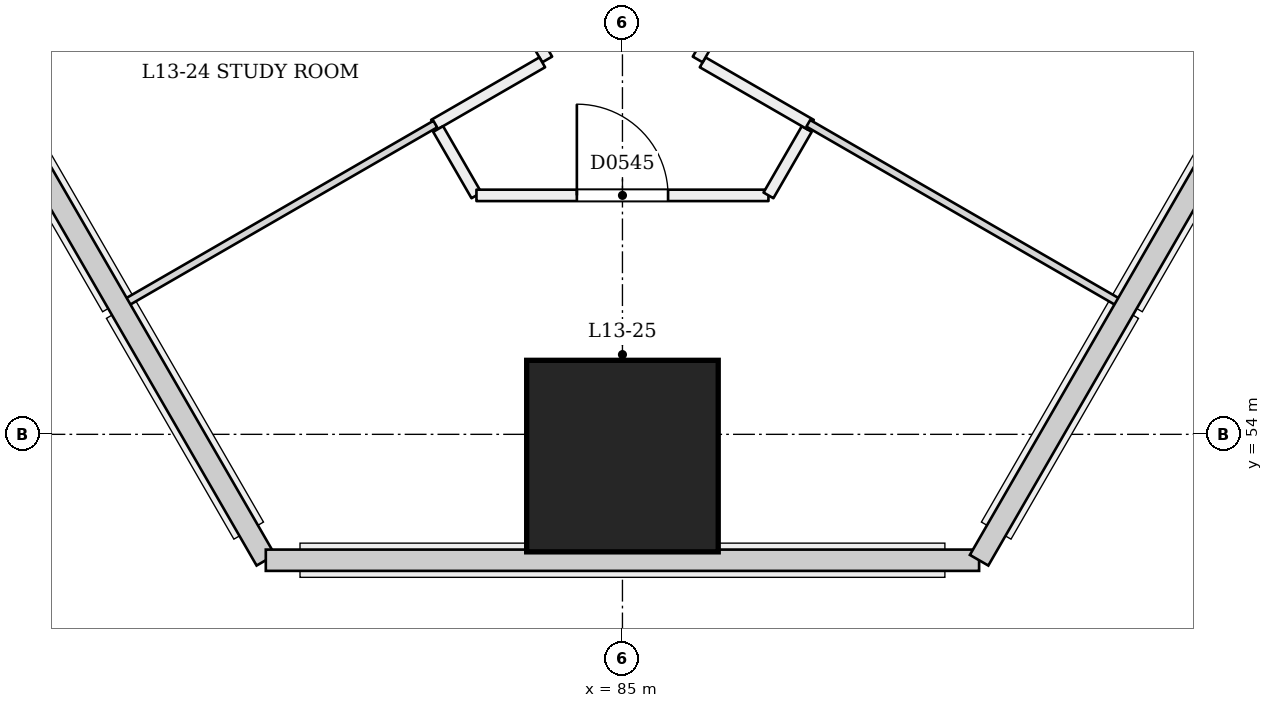
"""IFC4 building model, lengths in metres.
Left out: names, types, materials, properties, quantities, classifications, styles, units other than length and angle.
Written with IfcOpenShell. Run it as: python <this file> out.ifc"""

import sys

from ifc_helpers import new_model, si_unit, direction, frame, frame_2d, origin, origin_2d, place, context, subcontext, project, spatial, rectangle, extrude, element, fill, save


model = new_model("IFC4")
c1 = context("Model", 3, precision=1e-05, world=origin(), true_north=direction((0.0, 1.0)))
c2 = subcontext(c1, "Body", "Model", "MODEL_VIEW")
j1 = project(units=[si_unit("LENGTHUNIT", "METRE"), si_unit("PLANEANGLEUNIT", "RADIAN")], contexts=[c1])
p1 = place(None, origin())
s1 = spatial("IfcSite", under=j1, at=p1, CompositionType="ELEMENT")
p2 = place(p1, origin())
s2 = spatial("IfcBuilding", under=s1, at=p2, CompositionType="ELEMENT")
p3 = place(p2, frame((0.0, 0.0, 55.8)))
s3 = spatial("IfcBuildingStorey", under=s2, at=p3, CompositionType="ELEMENT", Elevation=55.8)
p4 = place(p3, frame((85.0, 53.644, 0.0), z_axis=(0.0, 0.058360852261, 0.998295552892), x_axis=(-1.0, 0.0, 0.0)))
e1 = element("IfcColumn", 1, at=p4, inside=s3, PredefinedType="COLUMN", context=c2, shape_type="SweptSolid", body=[
    extrude(rectangle(XDim=2.52, YDim=2.52, at=origin_2d()), origin(), (0.0, 0.0, 1.0), 3.606),
])
p5 = place(p3, frame((82.71, 61.184, 0.0), z_axis=(0.0, 0.0, 1.0), x_axis=(0.500006934395, -0.866021400173, 0.0)))
e2 = element("IfcWall", 2, at=p5, inside=s3, PredefinedType="PARTITIONING", context=c2, shape_type="SweptSolid", body=[
    extrude(rectangle(XDim=2.6, YDim=0.15, at=frame_2d((1.3, 0.0))), origin(), (0.0, 0.0, 1.0), 3.1),
])
p6 = place(p5, frame((0.294, 0.0, 0.0)))
e3 = element("IfcOpeningElement", 3, at=p6, cuts=e2, PredefinedType="OPENING", context=c2, shape_type="SweptSolid", body=[
    extrude(rectangle(XDim=1.0, YDim=2.1, at=frame_2d((0.5, 1.05))), frame((0.0, 0.085, 0.0), z_axis=(0.0, -1.0, 0.0), x_axis=(1.0, 0.0, 0.0)), (0.0, 0.0, 1.0), 0.171),
])
p7 = place(p3, frame((83.945, 58.894, 0.0), z_axis=(0.0, 0.0, 1.0), x_axis=(-0.866015045157, -0.50001794124, 0.0)))
e4 = element("IfcWall", 4, at=p7, inside=s3, PredefinedType="PARTITIONING", context=c2, shape_type="SweptSolid", body=[
    extrude(rectangle(XDim=1.645, YDim=0.15, at=frame_2d((0.823, 0.0))), origin(), (0.0, 0.0, 1.0), 3.1),
])
p8 = place(p3, frame((82.575, 58.017, 0.0), z_axis=(0.0, 0.0, 1.0), x_axis=(0.500071819257, -0.865983934946, 0.0)))
e5 = element("IfcWall", 5, at=p8, inside=s3, PredefinedType="PARTITIONING", context=c2, shape_type="SweptSolid", body=[
    extrude(rectangle(XDim=1.008, YDim=0.15, at=frame_2d((0.504, 0.0))), origin(), (0.0, 0.0, 1.0), 3.1),
])
p9 = place(p3, frame((83.079, 57.144, 0.0), z_axis=(0.0, 0.0, 1.0), x_axis=(1.0, 0.0, 0.0)))
e6 = element("IfcWall", 6, at=p9, inside=s3, PredefinedType="PARTITIONING", context=c2, shape_type="SweptSolid", body=[
    extrude(rectangle(XDim=3.842, YDim=0.15, at=frame_2d((1.921, 0.0))), origin(), (0.0, 0.0, 1.0), 3.1),
])
p10 = place(p9, frame((1.321, 0.0, 0.0)))
e7 = element("IfcOpeningElement", 7, at=p10, cuts=e6, PredefinedType="OPENING", context=c2, shape_type="SweptSolid", body=[
    extrude(rectangle(XDim=1.2, YDim=2.1, at=frame_2d((0.6, 1.05))), frame((0.0, 0.085, 0.0), z_axis=(0.0, -1.0, 0.0), x_axis=(1.0, 0.0, 0.0)), (0.0, 0.0, 1.0), 0.171),
])
p11 = place(p3, frame((86.921, 57.144, 0.0), z_axis=(0.0, 0.0, 1.0), x_axis=(0.500071819257, 0.865983934946, 0.0)))
e8 = element("IfcWall", 8, at=p11, inside=s3, PredefinedType="PARTITIONING", context=c2, shape_type="SweptSolid", body=[
    extrude(rectangle(XDim=1.008, YDim=0.15, at=frame_2d((0.504, 0.0))), origin(), (0.0, 0.0, 1.0), 3.1),
])
p12 = place(p3, frame((87.48, 58.072, 0.0), z_axis=(0.0, 0.0, 1.0), x_axis=(-0.866015045157, 0.50001794124, 0.0)))
e9 = element("IfcWall", 9, at=p12, inside=s3, PredefinedType="PARTITIONING", context=c2, shape_type="SweptSolid", body=[
    extrude(rectangle(XDim=1.645, YDim=0.15, at=frame_2d((0.823, 0.0))), origin(), (0.0, 0.0, 1.0), 3.1),
])
p13 = place(p3, frame((85.99, 58.932, 0.0), z_axis=(0.0, 0.0, 1.0), x_axis=(0.500001547762, 0.866024510182, 0.0)))
e10 = element("IfcWall", 10, at=p13, inside=s3, PredefinedType="PARTITIONING", context=c2, shape_type="SweptSolid", body=[
    extrude(rectangle(XDim=42.454, YDim=0.15, at=frame_2d((21.227, 0.0))), origin(), (0.0, 0.0, 1.0), 2.7),
])
p14 = place(p13, frame((3.577, 0.0, 0.0)))
e11 = element("IfcOpeningElement", 11, at=p14, cuts=e10, PredefinedType="OPENING", context=c2, shape_type="SweptSolid", body=[
    extrude(rectangle(XDim=1.2, YDim=2.1, at=frame_2d((0.6, 1.05))), frame((0.0, 0.085, 0.0), z_axis=(0.0, -1.0, 0.0), x_axis=(1.0, 0.0, 0.0)), (0.0, 0.0, 1.0), 0.171),
])
p15 = place(p13, frame((11.134, 0.0, 0.0)))
e12 = element("IfcOpeningElement", 12, at=p15, cuts=e10, PredefinedType="OPENING", context=c2, shape_type="SweptSolid", body=[
    extrude(rectangle(XDim=1.0, YDim=2.1, at=frame_2d((0.5, 1.05))), frame((0.0, 0.085, 0.0), z_axis=(0.0, -1.0, 0.0), x_axis=(1.0, 0.0, 0.0)), (0.0, 0.0, 1.0), 0.171),
])
p16 = place(p13, frame((13.575, 0.0, 0.0)))
e13 = element("IfcOpeningElement", 13, at=p16, cuts=e10, PredefinedType="OPENING", context=c2, shape_type="SweptSolid", body=[
    extrude(rectangle(XDim=1.0, YDim=2.1, at=frame_2d((0.5, 1.05))), frame((0.0, 0.085, 0.0), z_axis=(0.0, -1.0, 0.0), x_axis=(1.0, 0.0, 0.0)), (0.0, 0.0, 1.0), 0.171),
])
p17 = place(p13, frame((20.134, 0.0, 0.0)))
e14 = element("IfcOpeningElement", 14, at=p17, cuts=e10, PredefinedType="OPENING", context=c2, shape_type="SweptSolid", body=[
    extrude(rectangle(XDim=1.0, YDim=2.1, at=frame_2d((0.5, 1.05))), frame((0.0, 0.085, 0.0), z_axis=(0.0, -1.0, 0.0), x_axis=(1.0, 0.0, 0.0)), (0.0, 0.0, 1.0), 0.171),
])
p18 = place(p13, frame((22.575, 0.0, 0.0)))
e15 = element("IfcOpeningElement", 15, at=p18, cuts=e10, PredefinedType="OPENING", context=c2, shape_type="SweptSolid", body=[
    extrude(rectangle(XDim=1.0, YDim=2.1, at=frame_2d((0.5, 1.05))), frame((0.0, 0.085, 0.0), z_axis=(0.0, -1.0, 0.0), x_axis=(1.0, 0.0, 0.0)), (0.0, 0.0, 1.0), 0.171),
])
p19 = place(p13, frame((29.134, 0.0, 0.0)))
e16 = element("IfcOpeningElement", 16, at=p19, cuts=e10, PredefinedType="OPENING", context=c2, shape_type="SweptSolid", body=[
    extrude(rectangle(XDim=1.0, YDim=2.1, at=frame_2d((0.5, 1.05))), frame((0.0, 0.085, 0.0), z_axis=(0.0, -1.0, 0.0), x_axis=(1.0, 0.0, 0.0)), (0.0, 0.0, 1.0), 0.171),
])
p20 = place(p13, frame((31.575, 0.0, 0.0)))
e17 = element("IfcOpeningElement", 17, at=p20, cuts=e10, PredefinedType="OPENING", context=c2, shape_type="SweptSolid", body=[
    extrude(rectangle(XDim=1.0, YDim=2.1, at=frame_2d((0.5, 1.05))), frame((0.0, 0.085, 0.0), z_axis=(0.0, -1.0, 0.0), x_axis=(1.0, 0.0, 0.0)), (0.0, 0.0, 1.0), 0.171),
])
p21 = place(p13, frame((38.134, 0.0, 0.0)))
e18 = element("IfcOpeningElement", 18, at=p21, cuts=e10, PredefinedType="OPENING", context=c2, shape_type="SweptSolid", body=[
    extrude(rectangle(XDim=1.0, YDim=2.1, at=frame_2d((0.5, 1.05))), frame((0.0, 0.085, 0.0), z_axis=(0.0, -1.0, 0.0), x_axis=(1.0, 0.0, 0.0)), (0.0, 0.0, 1.0), 0.171),
])
p22 = place(p13, frame((41.161, 0.0, 0.0)))
e19 = element("IfcOpeningElement", 19, at=p22, cuts=e10, PredefinedType="OPENING", context=c2, shape_type="SweptSolid", body=[
    extrude(rectangle(XDim=1.0, YDim=2.1, at=frame_2d((0.5, 1.05))), frame((0.0, 0.085, 0.0), z_axis=(0.0, -1.0, 0.0), x_axis=(1.0, 0.0, 0.0)), (0.0, 0.0, 1.0), 0.171),
])
p23 = place(p3, frame((76.522, 59.06, 0.0), z_axis=(0.0, 0.0, 1.0), x_axis=(0.866028828302, 0.499994068514, 0.0)))
e20 = element("IfcWall", 20, at=p23, inside=s3, PredefinedType="PARTITIONING", context=c2, shape_type="SweptSolid", body=[
    extrude(rectangle(XDim=4.72, YDim=0.15, at=frame_2d((2.36, 0.0))), origin(), (0.0, 0.0, 1.0), 2.6),
])
p24 = place(p3, frame((78.45, 55.722, 0.0), z_axis=(0.0, 0.0, 1.0), x_axis=(0.866028828302, 0.499994068514, 0.0)))
e21 = element("IfcWall", 21, at=p24, inside=s3, PredefinedType="PARTITIONING", context=c2, shape_type="SweptSolid", body=[
    extrude(rectangle(XDim=4.72, YDim=0.1, at=frame_2d((2.36, 0.0))), origin(), (0.0, 0.0, 1.0), 2.6),
])
p25 = place(p3, frame((91.55, 55.722, 0.0), z_axis=(0.0, 0.0, 1.0), x_axis=(-0.866028632512, 0.499994407638, 0.0)))
e22 = element("IfcWall", 22, at=p25, inside=s3, PredefinedType="PARTITIONING", context=c2, shape_type="SweptSolid", body=[
    extrude(rectangle(XDim=4.74, YDim=0.1, at=frame_2d((2.37, 0.0))), origin(), (0.0, 0.0, 1.0), 2.6),
])
p26 = place(p10, origin())
e23 = element("IfcDoor", 23, at=p26, inside=s3, OperationType="SINGLE_SWING_LEFT", PredefinedType="NOTDEFINED", context=c2, shape_type="SweptSolid", body=[
    extrude(rectangle(XDim=1.2, YDim=2.1, at=frame_2d((0.6, 1.05))), frame((0.0, 0.025, 0.0), z_axis=(0.0, -1.0, 0.0), x_axis=(1.0, 0.0, 0.0)), (0.0, 0.0, 1.0), 0.05),
])
fill(e7, e23)
save(model, sys.argv[1])
